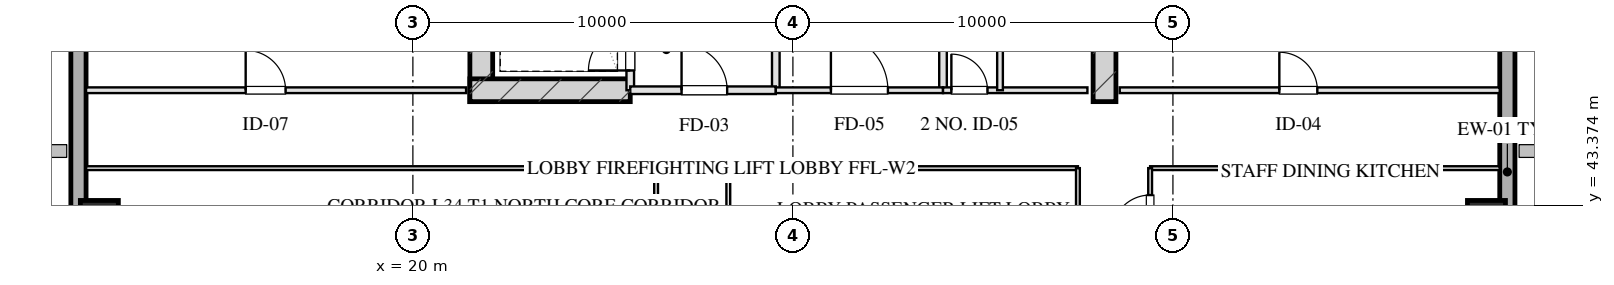
"""IFC4 building model, lengths in metres.
Left out: names, types, materials, properties, quantities, classifications, styles, units other than length and angle.
Written with IfcOpenShell. Run it as: python <this file> out.ifc"""

import sys

from ifc_helpers import new_model, si_unit, direction, frame, frame_2d, origin, origin_2d, place, context, subcontext, project, spatial, rectangle, hollow_rectangle, extrude, element, fill, save


model = new_model("IFC4")
c1 = context("Model", 3, precision=1e-05, world=origin(), true_north=direction((0.0, 1.0)))
c2 = subcontext(c1, "Body", "Model", "MODEL_VIEW")
j1 = project(units=[si_unit("LENGTHUNIT", "METRE"), si_unit("PLANEANGLEUNIT", "RADIAN")], contexts=[c1])
p1 = place(None, origin())
s1 = spatial("IfcSite", under=j1, at=p1, CompositionType="ELEMENT")
p2 = place(p1, origin())
s2 = spatial("IfcBuilding", under=s1, at=p2, CompositionType="ELEMENT")
p3 = place(p2, frame((0.0, 0.0, 131.1)))
s3 = spatial("IfcBuildingStorey", under=s2, at=p3, CompositionType="ELEMENT", Elevation=131.1)
for number, where, z_axis, x_axis in (
    (1, (21.8, 46.1, 0.0), (0.0, 0.0, 1.0), (0.0, 1.0, 0.0)),
    (2, (38.2, 46.1, 0.0), (0.0, 0.0, 1.0), (0.0, 1.0, 0.0)),
):
    element("IfcWall", number, at=place(p3, frame(where, z_axis=z_axis, x_axis=x_axis)), inside=s3, PredefinedType="SHEAR", context=c2, shape_type="SweptSolid", body=[
        extrude(rectangle(XDim=9.48, YDim=0.6, at=frame_2d((4.74, 0.0))), origin(), (0.0, 0.0, 1.0), 3.45),
    ])
p4 = place(p3, frame((21.5, 46.4, 0.0), z_axis=(0.0, 0.0, 1.0), x_axis=(1.0, 0.0, 0.0)))
e3 = element("IfcWall", 3, at=p4, inside=s3, PredefinedType="SHEAR", context=c2, shape_type="SweptSolid", body=[
    extrude(rectangle(XDim=4.22, YDim=0.6, at=frame_2d((2.11, 0.0))), origin(), (0.0, 0.0, 1.0), 3.45),
])
for number, where, z_axis, x_axis in (
    (4, (11.75, 43.0, 0.0), (0.0, 0.0, 1.0), (1.0, 0.0, 0.0)),
    (5, (48.25, 43.0, 0.0), (0.0, 0.0, 1.0), (1.0, 0.0, 0.0)),
):
    element("IfcColumn", number, at=place(p3, frame(where, z_axis=z_axis, x_axis=x_axis)), inside=s3, PredefinedType="COLUMN", context=c2, shape_type="SweptSolid", body=[
        extrude(hollow_rectangle(XDim=1.0, YDim=1.0, WallThickness=0.036, at=origin_2d()), origin(), (0.0, 0.0, 1.0), 3.451),
    ])
p5 = place(p3, frame((11.2, 9.0, 0.0), z_axis=(0.0, 0.0, 1.0), x_axis=(0.0, 1.0, 0.0)))
e6 = element("IfcWall", 6, at=p5, inside=s3, PredefinedType="SOLIDWALL", context=c2, shape_type="SweptSolid", body=[
    extrude(rectangle(XDim=50.0, YDim=0.4, at=frame_2d((25.0, 0.0))), origin(), (0.0, 0.0, 1.0), 2.61),
])
p6 = place(p5, frame((26.475, 0.0, 0.75)))
e7 = element("IfcOpeningElement", 7, at=p6, cuts=e6, PredefinedType="OPENING", context=c2, shape_type="SweptSolid", body=[
    extrude(rectangle(XDim=2.25, YDim=1.46, at=frame_2d((1.125, 0.73))), frame((0.0, 0.21, 0.0), z_axis=(0.0, -1.0, 0.0), x_axis=(1.0, 0.0, 0.0)), (0.0, 0.0, 1.0), 0.42),
])
p7 = place(p5, frame((30.275, 0.0, 0.75)))
e8 = element("IfcOpeningElement", 8, at=p7, cuts=e6, PredefinedType="OPENING", context=c2, shape_type="SweptSolid", body=[
    extrude(rectangle(XDim=2.25, YDim=1.46, at=frame_2d((1.125, 0.73))), frame((0.0, 0.21, 0.0), z_axis=(0.0, -1.0, 0.0), x_axis=(1.0, 0.0, 0.0)), (0.0, 0.0, 1.0), 0.42),
])
p8 = place(p5, frame((20.05, 0.0, 0.0)))
e9 = element("IfcOpeningElement", 9, at=p8, cuts=e6, PredefinedType="OPENING", context=c2, shape_type="SweptSolid", body=[
    extrude(rectangle(XDim=1.1, YDim=2.15, at=frame_2d((0.55, 1.075))), frame((0.0, 0.21, 0.0), z_axis=(0.0, -1.0, 0.0), x_axis=(1.0, 0.0, 0.0)), (0.0, 0.0, 1.0), 0.42),
])
p9 = place(p3, frame((48.8, 59.0, 0.0), z_axis=(0.0, 0.0, 1.0), x_axis=(0.0, -1.0, 0.0)))
e10 = element("IfcWall", 10, at=p9, inside=s3, PredefinedType="SOLIDWALL", context=c2, shape_type="SweptSolid", body=[
    extrude(rectangle(XDim=50.0, YDim=0.4, at=frame_2d((25.0, 0.0))), origin(), (0.0, 0.0, 1.0), 2.61),
])
p10 = place(p9, frame((21.275, 0.0, 0.75)))
e11 = element("IfcOpeningElement", 11, at=p10, cuts=e10, PredefinedType="OPENING", context=c2, shape_type="SweptSolid", body=[
    extrude(rectangle(XDim=2.25, YDim=1.46, at=frame_2d((1.125, 0.73))), frame((0.0, 0.21, 0.0), z_axis=(0.0, -1.0, 0.0), x_axis=(1.0, 0.0, 0.0)), (0.0, 0.0, 1.0), 0.42),
])
p11 = place(p9, frame((17.475, 0.0, 0.75)))
e12 = element("IfcOpeningElement", 12, at=p11, cuts=e10, PredefinedType="OPENING", context=c2, shape_type="SweptSolid", body=[
    extrude(rectangle(XDim=2.25, YDim=1.46, at=frame_2d((1.125, 0.73))), frame((0.0, 0.21, 0.0), z_axis=(0.0, -1.0, 0.0), x_axis=(1.0, 0.0, 0.0)), (0.0, 0.0, 1.0), 0.42),
])
p12 = place(p9, frame((30.25, 0.0, 0.0)))
e13 = element("IfcOpeningElement", 13, at=p12, cuts=e10, PredefinedType="OPENING", context=c2, shape_type="SweptSolid", body=[
    extrude(rectangle(XDim=1.1, YDim=2.15, at=frame_2d((0.55, 1.075))), frame((0.0, 0.21, 0.0), z_axis=(0.0, -1.0, 0.0), x_axis=(1.0, 0.0, 0.0)), (0.0, 0.0, 1.0), 0.42),
])
p13 = place(p3, frame((25.72, 46.4, 0.0), z_axis=(0.0, 0.0, 1.0), x_axis=(0.0, 1.0, 0.0)))
e14 = element("IfcWall", 14, at=p13, inside=s3, PredefinedType="PARTITIONING", context=c2, shape_type="SweptSolid", body=[
    extrude(rectangle(XDim=1.9, YDim=0.2, at=frame_2d((0.95, 0.0))), origin(), (0.0, 0.0, 1.0), 3.175),
])
p14 = place(p13, frame((0.52, 0.0, 0.0)))
e15 = element("IfcOpeningElement", 15, at=p14, cuts=e14, PredefinedType="OPENING", context=c2, shape_type="SweptSolid", body=[
    extrude(rectangle(XDim=1.1, YDim=2.05, at=frame_2d((0.55, 1.025))), frame((0.0, 0.11, 0.0), z_axis=(0.0, -1.0, 0.0), x_axis=(1.0, 0.0, 0.0)), (0.0, 0.0, 1.0), 0.22),
])
p15 = place(p3, frame((29.55, 46.4, 0.0), z_axis=(0.0, 0.0, 1.0), x_axis=(0.0, 1.0, 0.0)))
e16 = element("IfcWall", 16, at=p15, inside=s3, PredefinedType="PARTITIONING", context=c2, shape_type="SweptSolid", body=[
    extrude(rectangle(XDim=8.43, YDim=0.2, at=frame_2d((4.215, 0.0))), origin(), (0.0, 0.0, 1.0), 3.175),
])
p16 = place(p3, frame((25.72, 46.4, 0.0), z_axis=(0.0, 0.0, 1.0), x_axis=(1.0, 0.0, 0.0)))
e17 = element("IfcWall", 17, at=p16, inside=s3, PredefinedType="PARTITIONING", context=c2, shape_type="SweptSolid", body=[
    extrude(rectangle(XDim=3.83, YDim=0.2, at=frame_2d((1.915, 0.0))), origin(), (0.0, 0.0, 1.0), 3.175),
])
p17 = place(p16, frame((1.35, 0.0, 0.0)))
e18 = element("IfcOpeningElement", 18, at=p17, cuts=e17, PredefinedType="OPENING", context=c2, shape_type="SweptSolid", body=[
    extrude(rectangle(XDim=1.2, YDim=2.05, at=frame_2d((0.6, 1.025))), frame((0.0, 0.11, 0.0), z_axis=(0.0, -1.0, 0.0), x_axis=(1.0, 0.0, 0.0)), (0.0, 0.0, 1.0), 0.22),
])
p18 = place(p3, frame((33.95, 46.4, 0.0), z_axis=(0.0, 0.0, 1.0), x_axis=(0.0, 1.0, 0.0)))
e19 = element("IfcWall", 19, at=p18, inside=s3, PredefinedType="PARTITIONING", context=c2, shape_type="SweptSolid", body=[
    extrude(rectangle(XDim=8.43, YDim=0.2, at=frame_2d((4.215, 0.0))), origin(), (0.0, 0.0, 1.0), 3.175),
])
p19 = place(p3, frame((29.55, 46.4, 0.0), z_axis=(0.0, 0.0, 1.0), x_axis=(1.0, 0.0, 0.0)))
e20 = element("IfcWall", 20, at=p19, inside=s3, PredefinedType="PARTITIONING", context=c2, shape_type="SweptSolid", body=[
    extrude(rectangle(XDim=4.4, YDim=0.15, at=frame_2d((2.2, 0.0))), origin(), (0.0, 0.0, 1.0), 3.175),
])
p20 = place(p19, frame((1.45, 0.0, 0.0)))
e21 = element("IfcOpeningElement", 21, at=p20, cuts=e20, PredefinedType="OPENING", context=c2, shape_type="SweptSolid", body=[
    extrude(rectangle(XDim=1.5, YDim=2.05, at=frame_2d((0.75, 1.025))), frame((0.0, 0.085, 0.0), z_axis=(0.0, -1.0, 0.0), x_axis=(1.0, 0.0, 0.0)), (0.0, 0.0, 1.0), 0.17),
])
p21 = place(p3, frame((33.95, 46.4, 0.0), z_axis=(0.0, 0.0, 1.0), x_axis=(1.0, 0.0, 0.0)))
e22 = element("IfcWall", 22, at=p21, inside=s3, PredefinedType="PARTITIONING", context=c2, shape_type="SweptSolid", body=[
    extrude(rectangle(XDim=3.8, YDim=0.15, at=frame_2d((1.9, 0.0))), origin(), (0.0, 0.0, 1.0), 3.175),
])
p22 = place(p21, frame((0.22, 0.0, 0.0)))
e23 = element("IfcOpeningElement", 23, at=p22, cuts=e22, PredefinedType="OPENING", context=c2, shape_type="SweptSolid", body=[
    extrude(rectangle(XDim=0.95, YDim=2.05, at=frame_2d((0.475, 1.025))), frame((0.0, 0.085, 0.0), z_axis=(0.0, -1.0, 0.0), x_axis=(1.0, 0.0, 0.0)), (0.0, 0.0, 1.0), 0.17),
])
p23 = place(p3, frame((35.45, 46.4, 0.0), z_axis=(0.0, 0.0, 1.0), x_axis=(0.0, 1.0, 0.0)))
e24 = element("IfcWall", 24, at=p23, inside=s3, PredefinedType="PARTITIONING", context=c2, shape_type="SweptSolid", body=[
    extrude(rectangle(XDim=8.43, YDim=0.15, at=frame_2d((4.215, 0.0))), origin(), (0.0, 0.0, 1.0), 2.765),
])
p24 = place(p23, frame((2.55, 0.0, 0.0)))
e25 = element("IfcOpeningElement", 25, at=p24, cuts=e24, PredefinedType="OPENING", context=c2, shape_type="SweptSolid", body=[
    extrude(rectangle(XDim=0.95, YDim=2.05, at=frame_2d((0.475, 1.025))), frame((0.0, 0.085, 0.0), z_axis=(0.0, -1.0, 0.0), x_axis=(1.0, 0.0, 0.0)), (0.0, 0.0, 1.0), 0.17),
])
p25 = place(p23, frame((4.7, 0.0, 0.0)))
e26 = element("IfcOpeningElement", 26, at=p25, cuts=e24, PredefinedType="OPENING", context=c2, shape_type="SweptSolid", body=[
    extrude(rectangle(XDim=0.9, YDim=2.05, at=frame_2d((0.45, 1.025))), frame((0.0, 0.085, 0.0), z_axis=(0.0, -1.0, 0.0), x_axis=(1.0, 0.0, 0.0)), (0.0, 0.0, 1.0), 0.17),
])
p26 = place(p23, frame((6.8, 0.0, 0.0)))
e27 = element("IfcOpeningElement", 27, at=p26, cuts=e24, PredefinedType="OPENING", context=c2, shape_type="SweptSolid", body=[
    extrude(rectangle(XDim=0.9, YDim=2.05, at=frame_2d((0.45, 1.025))), frame((0.0, 0.085, 0.0), z_axis=(0.0, -1.0, 0.0), x_axis=(1.0, 0.0, 0.0)), (0.0, 0.0, 1.0), 0.17),
])
p27 = place(p3, frame((11.4, 46.4, 0.0), z_axis=(0.0, 0.0, 1.0), x_axis=(1.0, 0.0, 0.0)))
e28 = element("IfcWall", 28, at=p27, inside=s3, PredefinedType="PARTITIONING", context=c2, shape_type="SweptSolid", body=[
    extrude(rectangle(XDim=10.0, YDim=0.15, at=frame_2d((5.0, 0.0))), origin(), (0.0, 0.0, 1.0), 3.175),
])
p28 = place(p27, frame((4.2, 0.0, 0.0)))
e29 = element("IfcOpeningElement", 29, at=p28, cuts=e28, PredefinedType="OPENING", context=c2, shape_type="SweptSolid", body=[
    extrude(rectangle(XDim=1.05, YDim=2.05, at=frame_2d((0.525, 1.025))), frame((0.0, 0.085, 0.0), z_axis=(0.0, -1.0, 0.0), x_axis=(1.0, 0.0, 0.0)), (0.0, 0.0, 1.0), 0.17),
])
p29 = place(p3, frame((38.6, 46.4, 0.0), z_axis=(0.0, 0.0, 1.0), x_axis=(1.0, 0.0, 0.0)))
e30 = element("IfcWall", 30, at=p29, inside=s3, PredefinedType="PARTITIONING", context=c2, shape_type="SweptSolid", body=[
    extrude(rectangle(XDim=10.0, YDim=0.15, at=frame_2d((5.0, 0.0))), origin(), (0.0, 0.0, 1.0), 3.175),
])
p30 = place(p29, frame((4.2, 0.0, 0.0)))
e31 = element("IfcOpeningElement", 31, at=p30, cuts=e30, PredefinedType="OPENING", context=c2, shape_type="SweptSolid", body=[
    extrude(rectangle(XDim=1.0, YDim=2.05, at=frame_2d((0.5, 1.025))), frame((0.0, 0.085, 0.0), z_axis=(0.0, -1.0, 0.0), x_axis=(1.0, 0.0, 0.0)), (0.0, 0.0, 1.0), 0.17),
])
p31 = place(p3, frame((11.4, 44.35, 0.0), z_axis=(0.0, 0.0, 1.0), x_axis=(1.0, 0.0, 0.0)))
e32 = element("IfcWall", 32, at=p31, inside=s3, PredefinedType="MOVABLE", context=c2, shape_type="SweptSolid", body=[
    extrude(rectangle(XDim=15.0, YDim=0.1, at=frame_2d((7.5, 0.0))), origin(), (0.0, 0.0, 1.0), 3.175),
])
p32 = place(p3, frame((28.3, 44.35, 0.0), z_axis=(0.0, 0.0, 1.0), x_axis=(1.0, 0.0, 0.0)))
e33 = element("IfcWall", 33, at=p32, inside=s3, PredefinedType="MOVABLE", context=c2, shape_type="SweptSolid", body=[
    extrude(rectangle(XDim=9.2, YDim=0.1, at=frame_2d((4.6, 0.0))), origin(), (0.0, 0.0, 1.0), 3.175),
])
p33 = place(p3, frame((39.4, 44.35, 0.0), z_axis=(0.0, 0.0, 1.0), x_axis=(1.0, 0.0, 0.0)))
e34 = element("IfcWall", 34, at=p33, inside=s3, PredefinedType="MOVABLE", context=c2, shape_type="SweptSolid", body=[
    extrude(rectangle(XDim=9.2, YDim=0.1, at=frame_2d((4.6, 0.0))), origin(), (0.0, 0.0, 1.0), 3.175),
])
p34 = place(p3, frame((26.4, 23.65, 0.0), z_axis=(0.0, 0.0, 1.0), x_axis=(0.0, 1.0, 0.0)))
e35 = element("IfcWall", 35, at=p34, inside=s3, PredefinedType="MOVABLE", context=c2, shape_type="SweptSolid", body=[
    extrude(rectangle(XDim=20.7, YDim=0.1, at=frame_2d((10.35, 0.0))), origin(), (0.0, 0.0, 1.0), 3.175),
])
p35 = place(p34, frame((4.124, 0.0, 0.0)))
e36 = element("IfcOpeningElement", 36, at=p35, cuts=e35, PredefinedType="OPENING", context=c2, shape_type="SweptSolid", body=[
    extrude(rectangle(XDim=1.0, YDim=2.05, at=frame_2d((0.5, 1.025))), frame((0.0, 0.06, 0.0), z_axis=(0.0, -1.0, 0.0), x_axis=(1.0, 0.0, 0.0)), (0.0, 0.0, 1.0), 0.12),
])
p36 = place(p34, frame((14.473, 0.0, 0.0)))
e37 = element("IfcOpeningElement", 37, at=p36, cuts=e35, PredefinedType="OPENING", context=c2, shape_type="SweptSolid", body=[
    extrude(rectangle(XDim=1.0, YDim=2.05, at=frame_2d((0.5, 1.025))), frame((0.0, 0.06, 0.0), z_axis=(0.0, -1.0, 0.0), x_axis=(1.0, 0.0, 0.0)), (0.0, 0.0, 1.0), 0.12),
])
p37 = place(p3, frame((28.3, 23.65, 0.0), z_axis=(0.0, 0.0, 1.0), x_axis=(0.0, 1.0, 0.0)))
e38 = element("IfcWall", 38, at=p37, inside=s3, PredefinedType="MOVABLE", context=c2, shape_type="SweptSolid", body=[
    extrude(rectangle(XDim=20.7, YDim=0.1, at=frame_2d((10.35, 0.0))), origin(), (0.0, 0.0, 1.0), 3.175),
])
p38 = place(p37, frame((4.117, 0.0, 0.0)))
e39 = element("IfcOpeningElement", 39, at=p38, cuts=e38, PredefinedType="OPENING", context=c2, shape_type="SweptSolid", body=[
    extrude(rectangle(XDim=1.1, YDim=2.05, at=frame_2d((0.55, 1.025))), frame((0.0, 0.06, 0.0), z_axis=(0.0, -1.0, 0.0), x_axis=(1.0, 0.0, 0.0)), (0.0, 0.0, 1.0), 0.12),
])
p39 = place(p37, frame((14.347, 0.0, 0.0)))
e40 = element("IfcOpeningElement", 40, at=p39, cuts=e38, PredefinedType="OPENING", context=c2, shape_type="SweptSolid", body=[
    extrude(rectangle(XDim=1.1, YDim=2.05, at=frame_2d((0.55, 1.025))), frame((0.0, 0.06, 0.0), z_axis=(0.0, -1.0, 0.0), x_axis=(1.0, 0.0, 0.0)), (0.0, 0.0, 1.0), 0.12),
])
p40 = place(p3, frame((37.5, 23.65, 0.0), z_axis=(0.0, 0.0, 1.0), x_axis=(0.0, 1.0, 0.0)))
e41 = element("IfcWall", 41, at=p40, inside=s3, PredefinedType="MOVABLE", context=c2, shape_type="SweptSolid", body=[
    extrude(rectangle(XDim=20.7, YDim=0.1, at=frame_2d((10.35, 0.0))), origin(), (0.0, 0.0, 1.0), 3.175),
])
p41 = place(p3, frame((39.4, 23.65, 0.0), z_axis=(0.0, 0.0, 1.0), x_axis=(0.0, 1.0, 0.0)))
e42 = element("IfcWall", 42, at=p41, inside=s3, PredefinedType="MOVABLE", context=c2, shape_type="SweptSolid", body=[
    extrude(rectangle(XDim=20.7, YDim=0.1, at=frame_2d((10.35, 0.0))), origin(), (0.0, 0.0, 1.0), 3.175),
])
p42 = place(p41, frame((0.775, 0.0, 0.0)))
e43 = element("IfcOpeningElement", 43, at=p42, cuts=e42, PredefinedType="OPENING", context=c2, shape_type="SweptSolid", body=[
    extrude(rectangle(XDim=1.0, YDim=2.05, at=frame_2d((0.5, 1.025))), frame((0.0, 0.06, 0.0), z_axis=(0.0, -1.0, 0.0), x_axis=(1.0, 0.0, 0.0)), (0.0, 0.0, 1.0), 0.12),
])
p43 = place(p41, frame((3.95, 0.0, 0.0)))
e44 = element("IfcOpeningElement", 44, at=p43, cuts=e42, PredefinedType="OPENING", context=c2, shape_type="SweptSolid", body=[
    extrude(rectangle(XDim=1.05, YDim=2.05, at=frame_2d((0.525, 1.025))), frame((0.0, 0.06, 0.0), z_axis=(0.0, -1.0, 0.0), x_axis=(1.0, 0.0, 0.0)), (0.0, 0.0, 1.0), 0.12),
])
p44 = place(p41, frame((8.298, 0.0, 0.0)))
e45 = element("IfcOpeningElement", 45, at=p44, cuts=e42, PredefinedType="OPENING", context=c2, shape_type="SweptSolid", body=[
    extrude(rectangle(XDim=0.85, YDim=2.05, at=frame_2d((0.425, 1.025))), frame((0.0, 0.06, 0.0), z_axis=(0.0, -1.0, 0.0), x_axis=(1.0, 0.0, 0.0)), (0.0, 0.0, 1.0), 0.12),
])
p45 = place(p41, frame((12.712, 0.0, 0.0)))
e46 = element("IfcOpeningElement", 46, at=p45, cuts=e42, PredefinedType="OPENING", context=c2, shape_type="SweptSolid", body=[
    extrude(rectangle(XDim=1.0, YDim=2.05, at=frame_2d((0.5, 1.025))), frame((0.0, 0.06, 0.0), z_axis=(0.0, -1.0, 0.0), x_axis=(1.0, 0.0, 0.0)), (0.0, 0.0, 1.0), 0.12),
])
p46 = place(p41, frame((16.231, 0.0, 0.0)))
e47 = element("IfcOpeningElement", 47, at=p46, cuts=e42, PredefinedType="OPENING", context=c2, shape_type="SweptSolid", body=[
    extrude(rectangle(XDim=1.0, YDim=2.05, at=frame_2d((0.5, 1.025))), frame((0.0, 0.06, 0.0), z_axis=(0.0, -1.0, 0.0), x_axis=(1.0, 0.0, 0.0)), (0.0, 0.0, 1.0), 0.12),
])
p47 = place(p41, frame((18.992, 0.0, 0.0)))
e48 = element("IfcOpeningElement", 48, at=p47, cuts=e42, PredefinedType="OPENING", context=c2, shape_type="SweptSolid", body=[
    extrude(rectangle(XDim=1.0, YDim=2.05, at=frame_2d((0.5, 1.025))), frame((0.0, 0.06, 0.0), z_axis=(0.0, -1.0, 0.0), x_axis=(1.0, 0.0, 0.0)), (0.0, 0.0, 1.0), 0.12),
])
p48 = place(p14, origin())
e49 = element("IfcDoor", 49, at=p48, inside=s3, OperationType="SINGLE_SWING_LEFT", PredefinedType="DOOR", context=c2, shape_type="SweptSolid", body=[
    extrude(rectangle(XDim=1.1, YDim=2.05, at=frame_2d((0.55, 1.025))), frame((0.0, 0.025, 0.0), z_axis=(0.0, -1.0, 0.0), x_axis=(1.0, 0.0, 0.0)), (0.0, 0.0, 1.0), 0.05),
])
fill(e15, e49)
p49 = place(p17, origin())
e50 = element("IfcDoor", 50, at=p49, inside=s3, OperationType="SINGLE_SWING_LEFT", PredefinedType="DOOR", context=c2, shape_type="SweptSolid", body=[
    extrude(rectangle(XDim=1.2, YDim=2.05, at=frame_2d((0.6, 1.025))), frame((0.0, 0.025, 0.0), z_axis=(0.0, -1.0, 0.0), x_axis=(1.0, 0.0, 0.0)), (0.0, 0.0, 1.0), 0.05),
])
fill(e18, e50)
p50 = place(p20, origin())
e51 = element("IfcDoor", 51, at=p50, inside=s3, OperationType="SINGLE_SWING_LEFT", PredefinedType="DOOR", context=c2, shape_type="SweptSolid", body=[
    extrude(rectangle(XDim=1.5, YDim=2.05, at=frame_2d((0.75, 1.025))), frame((0.0, 0.025, 0.0), z_axis=(0.0, -1.0, 0.0), x_axis=(1.0, 0.0, 0.0)), (0.0, 0.0, 1.0), 0.05),
])
fill(e21, e51)
p51 = place(p22, origin())
e52 = element("IfcDoor", 52, at=p51, inside=s3, OperationType="SINGLE_SWING_LEFT", PredefinedType="DOOR", context=c2, shape_type="SweptSolid", body=[
    extrude(rectangle(XDim=0.95, YDim=2.05, at=frame_2d((0.475, 1.025))), frame((0.0, 0.025, 0.0), z_axis=(0.0, -1.0, 0.0), x_axis=(1.0, 0.0, 0.0)), (0.0, 0.0, 1.0), 0.05),
])
fill(e23, e52)
p52 = place(p28, origin())
e53 = element("IfcDoor", 53, at=p52, inside=s3, OperationType="SINGLE_SWING_LEFT", PredefinedType="DOOR", context=c2, shape_type="SweptSolid", body=[
    extrude(rectangle(XDim=1.05, YDim=2.05, at=frame_2d((0.525, 1.025))), frame((0.0, 0.025, 0.0), z_axis=(0.0, -1.0, 0.0), x_axis=(1.0, 0.0, 0.0)), (0.0, 0.0, 1.0), 0.05),
])
fill(e29, e53)
p53 = place(p30, origin())
e54 = element("IfcDoor", 54, at=p53, inside=s3, OperationType="SINGLE_SWING_LEFT", PredefinedType="DOOR", context=c2, shape_type="SweptSolid", body=[
    extrude(rectangle(XDim=1.0, YDim=2.05, at=frame_2d((0.5, 1.025))), frame((0.0, 0.025, 0.0), z_axis=(0.0, -1.0, 0.0), x_axis=(1.0, 0.0, 0.0)), (0.0, 0.0, 1.0), 0.05),
])
fill(e31, e54)
p54 = place(p47, origin())
e55 = element("IfcDoor", 55, at=p54, inside=s3, OperationType="SINGLE_SWING_LEFT", PredefinedType="DOOR", context=c2, shape_type="SweptSolid", body=[
    extrude(rectangle(XDim=1.0, YDim=2.05, at=frame_2d((0.5, 1.025))), frame((0.0, 0.025, 0.0), z_axis=(0.0, -1.0, 0.0), x_axis=(1.0, 0.0, 0.0)), (0.0, 0.0, 1.0), 0.05),
])
fill(e48, e55)
save(model, sys.argv[1])
